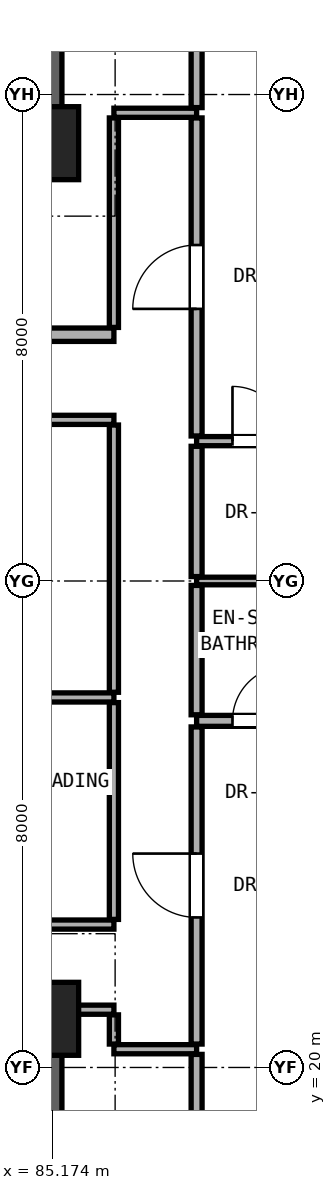
"""IFC4 building model, lengths in metres.
Left out: names, types, materials, properties, quantities, classifications, styles, units other than length and angle.
Written with IfcOpenShell. Run it as: python <this file> out.ifc"""

import sys

from ifc_helpers import new_model, si_unit, direction, frame, frame_2d, origin, origin_2d, place, context, subcontext, project, spatial, rectangle, extrude, element, fill, save


model = new_model("IFC4")
c1 = context("Model", 3, precision=1e-05, world=origin(), true_north=direction((0.0, 1.0)))
c2 = subcontext(c1, "Body", "Model", "MODEL_VIEW")
j1 = project(units=[si_unit("LENGTHUNIT", "METRE"), si_unit("PLANEANGLEUNIT", "RADIAN")], contexts=[c1])
p1 = place(None, origin())
s1 = spatial("IfcSite", under=j1, at=p1, CompositionType="ELEMENT")
p2 = place(p1, origin())
s2 = spatial("IfcBuilding", under=s1, at=p2, CompositionType="ELEMENT")
p3 = place(p2, frame((0.0, 0.0, 101.6)))
s3 = spatial("IfcBuildingStorey", under=s2, at=p3, CompositionType="ELEMENT", Elevation=101.6)
for number, where, z_axis, x_axis in (
    (1, (85.0, 20.8, 0.0), (0.0, 0.0, 1.0), (1.0, 0.0, 0.0)),
    (2, (85.0, 35.2, 0.0), (0.0, 0.0, 1.0), (1.0, 0.0, 0.0)),
):
    element("IfcColumn", number, at=place(p3, frame(where, z_axis=z_axis, x_axis=x_axis)), inside=s3, PredefinedType="COLUMN", context=c2, shape_type="SweptSolid", body=[
        extrude(rectangle(XDim=1.2, YDim=1.2, at=origin_2d()), origin(), (0.0, 0.0, 1.0), 3.3),
    ])
for number, where, z_axis, x_axis in (
    (3, (85.0, 35.2, 0.0), (0.0, 0.0, 1.0), (0.0, 1.0, 0.0)),
    (4, (85.0, 15.2, 0.0), (0.0, 0.0, 1.0), (0.0, 1.0, 0.0)),
):
    element("IfcWall", number, at=place(p3, frame(where, z_axis=z_axis, x_axis=x_axis)), inside=s3, PredefinedType="SHEAR", context=c2, shape_type="SweptSolid", body=[
        extrude(rectangle(XDim=5.6, YDim=0.65, at=frame_2d((2.8, 0.0))), origin(), (0.0, 0.0, 1.0), 3.08),
    ])
p4 = place(p3, frame((86.18, 20.3, 0.0), z_axis=(0.0, 0.0, 1.0), x_axis=(1.0, 0.0, 0.0)))
e5 = element("IfcWall", 5, at=p4, inside=s3, PredefinedType="PARTITIONING", context=c2, shape_type="SweptSolid", body=[
    extrude(rectangle(XDim=1.36, YDim=0.15, at=frame_2d((0.68, 0.0))), origin(), (0.0, 0.0, 1.0), 3.08),
])
p5 = place(p3, frame((85.32, 20.95, 0.0), z_axis=(0.0, 0.0, 1.0), x_axis=(1.0, 0.0, 0.0)))
e6 = element("IfcWall", 6, at=p5, inside=s3, PredefinedType="PARTITIONING", context=c2, shape_type="SweptSolid", body=[
    extrude(rectangle(XDim=0.86, YDim=0.15, at=frame_2d((0.43, 0.0))), origin(), (0.0, 0.0, 1.0), 2.472),
])
p6 = place(p3, frame((66.68, 22.35, 0.0), z_axis=(0.0, 0.0, 1.0), x_axis=(1.0, 0.0, 0.0)))
e7 = element("IfcWall", 7, at=p6, inside=s3, PredefinedType="PARTITIONING", context=c2, shape_type="SweptSolid", body=[
    extrude(rectangle(XDim=19.5, YDim=0.15, at=frame_2d((9.75, 0.0))), origin(), (0.0, 0.0, 1.0), 2.145),
])
p7 = place(p6, frame((8.902, 0.0, 0.0)))
e8 = element("IfcOpeningElement", 8, at=p7, cuts=e7, PredefinedType="OPENING", context=c2, shape_type="SweptSolid", body=[
    extrude(rectangle(XDim=0.85, YDim=2.01, at=frame_2d((0.425, 1.005))), frame((0.0, 0.085, 0.0), z_axis=(0.0, -1.0, 0.0), x_axis=(1.0, 0.0, 0.0)), (0.0, 0.0, 1.0), 0.17),
])
p8 = place(p6, frame((15.947, 0.0, 0.0)))
e9 = element("IfcOpeningElement", 9, at=p8, cuts=e7, PredefinedType="OPENING", context=c2, shape_type="SweptSolid", body=[
    extrude(rectangle(XDim=0.85, YDim=2.01, at=frame_2d((0.425, 1.005))), frame((0.0, 0.085, 0.0), z_axis=(0.0, -1.0, 0.0), x_axis=(1.0, 0.0, 0.0)), (0.0, 0.0, 1.0), 0.17),
])
p9 = place(p3, frame((87.54, 25.7, 0.0), z_axis=(0.0, 0.0, 1.0), x_axis=(1.0, 0.0, 0.0)))
e10 = element("IfcWall", 10, at=p9, inside=s3, PredefinedType="PARTITIONING", context=c2, shape_type="SweptSolid", body=[
    extrude(rectangle(XDim=7.054, YDim=0.18, at=frame_2d((3.527, 0.0))), origin(), (0.0, 0.0, 1.0), 2.216),
])
p10 = place(p9, frame((4.052, 0.0, 0.0)))
e11 = element("IfcOpeningElement", 11, at=p10, cuts=e10, PredefinedType="OPENING", context=c2, shape_type="SweptSolid", body=[
    extrude(rectangle(XDim=0.95, YDim=2.15, at=frame_2d((0.475, 1.075))), frame((0.0, 0.1, 0.0), z_axis=(0.0, -1.0, 0.0), x_axis=(1.0, 0.0, 0.0)), (0.0, 0.0, 1.0), 0.2),
])
p11 = place(p9, frame((0.59, 0.0, 0.0)))
e12 = element("IfcOpeningElement", 12, at=p11, cuts=e10, PredefinedType="OPENING", context=c2, shape_type="SweptSolid", body=[
    extrude(rectangle(XDim=0.9, YDim=2.1, at=frame_2d((0.45, 1.05))), frame((0.0, 0.1, 0.0), z_axis=(0.0, -1.0, 0.0), x_axis=(1.0, 0.0, 0.0)), (0.0, 0.0, 1.0), 0.2),
])
p12 = place(p3, frame((72.05, 26.085, 0.0), z_axis=(0.0, 0.0, 1.0), x_axis=(1.0, 0.0, 0.0)))
e13 = element("IfcWall", 13, at=p12, inside=s3, PredefinedType="PARTITIONING", context=c2, shape_type="SweptSolid", body=[
    extrude(rectangle(XDim=14.13, YDim=0.15, at=frame_2d((7.065, 0.0))), origin(), (0.0, 0.0, 1.0), 2.145),
])
p13 = place(p3, frame((87.54, 28.0, 0.0), z_axis=(0.0, 0.0, 1.0), x_axis=(1.0, 0.0, 0.0)))
e14 = element("IfcWall", 14, at=p13, inside=s3, PredefinedType="PARTITIONING", context=c2, shape_type="SweptSolid", body=[
    extrude(rectangle(XDim=7.054, YDim=0.125, at=frame_2d((3.527, 0.0))), origin(), (0.0, 0.0, 1.0), 2.216),
])
p14 = place(p3, frame((87.54, 30.3, 0.0), z_axis=(0.0, 0.0, 1.0), x_axis=(1.0, 0.0, 0.0)))
e15 = element("IfcWall", 15, at=p14, inside=s3, PredefinedType="PARTITIONING", context=c2, shape_type="SweptSolid", body=[
    extrude(rectangle(XDim=7.054, YDim=0.15, at=frame_2d((3.527, 0.0))), origin(), (0.0, 0.0, 1.0), 2.216),
])
p15 = place(p14, frame((4.052, 0.0, 0.0)))
e16 = element("IfcOpeningElement", 16, at=p15, cuts=e15, PredefinedType="OPENING", context=c2, shape_type="SweptSolid", body=[
    extrude(rectangle(XDim=0.95, YDim=2.15, at=frame_2d((0.475, 1.075))), frame((0.0, 0.085, 0.0), z_axis=(0.0, -1.0, 0.0), x_axis=(1.0, 0.0, 0.0)), (0.0, 0.0, 1.0), 0.17),
])
p16 = place(p14, frame((0.59, 0.0, 0.0)))
e17 = element("IfcOpeningElement", 17, at=p16, cuts=e15, PredefinedType="OPENING", context=c2, shape_type="SweptSolid", body=[
    extrude(rectangle(XDim=0.9, YDim=2.1, at=frame_2d((0.45, 1.05))), frame((0.0, 0.085, 0.0), z_axis=(0.0, -1.0, 0.0), x_axis=(1.0, 0.0, 0.0)), (0.0, 0.0, 1.0), 0.17),
])
p17 = place(p3, frame((66.68, 30.65, 0.0), z_axis=(0.0, 0.0, 1.0), x_axis=(1.0, 0.0, 0.0)))
e18 = element("IfcWall", 18, at=p17, inside=s3, PredefinedType="PARTITIONING", context=c2, shape_type="SweptSolid", body=[
    extrude(rectangle(XDim=19.5, YDim=0.15, at=frame_2d((9.75, 0.0))), origin(), (0.0, 0.0, 1.0), 2.145),
])
p18 = place(p17, frame((3.795, 0.0, 0.0)))
e19 = element("IfcOpeningElement", 19, at=p18, cuts=e18, PredefinedType="OPENING", context=c2, shape_type="SweptSolid", body=[
    extrude(rectangle(XDim=0.85, YDim=2.01, at=frame_2d((0.425, 1.005))), frame((0.0, 0.085, 0.0), z_axis=(0.0, -1.0, 0.0), x_axis=(1.0, 0.0, 0.0)), (0.0, 0.0, 1.0), 0.17),
])
p19 = place(p17, frame((8.902, 0.0, 0.0)))
e20 = element("IfcOpeningElement", 20, at=p19, cuts=e18, PredefinedType="OPENING", context=c2, shape_type="SweptSolid", body=[
    extrude(rectangle(XDim=0.85, YDim=2.01, at=frame_2d((0.425, 1.005))), frame((0.0, 0.085, 0.0), z_axis=(0.0, -1.0, 0.0), x_axis=(1.0, 0.0, 0.0)), (0.0, 0.0, 1.0), 0.17),
])
p20 = place(p17, frame((15.947, 0.0, 0.0)))
e21 = element("IfcOpeningElement", 21, at=p20, cuts=e18, PredefinedType="OPENING", context=c2, shape_type="SweptSolid", body=[
    extrude(rectangle(XDim=0.85, YDim=2.01, at=frame_2d((0.425, 1.005))), frame((0.0, 0.085, 0.0), z_axis=(0.0, -1.0, 0.0), x_axis=(1.0, 0.0, 0.0)), (0.0, 0.0, 1.0), 0.17),
])
p21 = place(p3, frame((71.55, 32.05, 0.0), z_axis=(0.0, 0.0, 1.0), x_axis=(1.0, 0.0, 0.0)))
e22 = element("IfcWall", 22, at=p21, inside=s3, PredefinedType="SOLIDWALL", context=c2, shape_type="SweptSolid", body=[
    extrude(rectangle(XDim=14.63, YDim=0.22, at=frame_2d((7.315, 0.0))), origin(), (0.0, 0.0, 1.0), 2.145),
])
p22 = place(p21, frame((6.065, 0.0, 0.0)))
e23 = element("IfcOpeningElement", 23, at=p22, cuts=e22, PredefinedType="OPENING", context=c2, shape_type="SweptSolid", body=[
    extrude(rectangle(XDim=0.85, YDim=2.01, at=frame_2d((0.425, 1.005))), frame((0.0, 0.12, 0.0), z_axis=(0.0, -1.0, 0.0), x_axis=(1.0, 0.0, 0.0)), (0.0, 0.0, 1.0), 0.24),
])
p23 = place(p21, frame((10.585, 0.0, 0.0)))
e24 = element("IfcOpeningElement", 24, at=p23, cuts=e22, PredefinedType="OPENING", context=c2, shape_type="SweptSolid", body=[
    extrude(rectangle(XDim=0.85, YDim=2.01, at=frame_2d((0.425, 1.005))), frame((0.0, 0.12, 0.0), z_axis=(0.0, -1.0, 0.0), x_axis=(1.0, 0.0, 0.0)), (0.0, 0.0, 1.0), 0.24),
])
p24 = place(p21, frame((1.65, 0.0, 0.0)))
e25 = element("IfcOpeningElement", 25, at=p24, cuts=e22, PredefinedType="OPENING", context=c2, shape_type="SweptSolid", body=[
    extrude(rectangle(XDim=0.85, YDim=2.01, at=frame_2d((0.425, 1.005))), frame((0.0, 0.12, 0.0), z_axis=(0.0, -1.0, 0.0), x_axis=(1.0, 0.0, 0.0)), (0.0, 0.0, 1.0), 0.24),
])
p25 = place(p3, frame((86.18, 35.7, 0.0), z_axis=(0.0, 0.0, 1.0), x_axis=(1.0, 0.0, 0.0)))
e26 = element("IfcWall", 26, at=p25, inside=s3, PredefinedType="PARTITIONING", context=c2, shape_type="SweptSolid", body=[
    extrude(rectangle(XDim=1.36, YDim=0.15, at=frame_2d((0.68, 0.0))), origin(), (0.0, 0.0, 1.0), 3.08),
])
p26 = place(p3, frame((86.18, 20.385, 0.0), z_axis=(0.0, 0.0, 1.0), x_axis=(0.0, 1.0, 0.0)))
e27 = element("IfcWall", 27, at=p26, inside=s3, PredefinedType="PARTITIONING", context=c2, shape_type="SweptSolid", body=[
    extrude(rectangle(XDim=0.48, YDim=0.15, at=frame_2d((0.24, 0.0))), origin(), (0.0, 0.0, 1.0), 2.472),
])
p27 = place(p3, frame((86.18, 22.435, 0.0), z_axis=(0.0, 0.0, 1.0), x_axis=(0.0, 1.0, 0.0)))
e28 = element("IfcWall", 28, at=p27, inside=s3, PredefinedType="PARTITIONING", context=c2, shape_type="SweptSolid", body=[
    extrude(rectangle(XDim=3.565, YDim=0.15, at=frame_2d((1.782, 0.0))), origin(), (0.0, 0.0, 1.0), 3.08),
])
p28 = place(p3, frame((86.18, 26.17, 0.0), z_axis=(0.0, 0.0, 1.0), x_axis=(0.0, 1.0, 0.0)))
e29 = element("IfcWall", 29, at=p28, inside=s3, PredefinedType="PARTITIONING", context=c2, shape_type="SweptSolid", body=[
    extrude(rectangle(XDim=4.395, YDim=0.15, at=frame_2d((2.198, 0.0))), origin(), (0.0, 0.0, 1.0), 2.299),
])
p29 = place(p3, frame((86.18, 32.17, 0.0), z_axis=(0.0, 0.0, 1.0), x_axis=(0.0, 1.0, 0.0)))
e30 = element("IfcWall", 30, at=p29, inside=s3, PredefinedType="PARTITIONING", context=c2, shape_type="SweptSolid", body=[
    extrude(rectangle(XDim=3.445, YDim=0.15, at=frame_2d((1.723, 0.0))), origin(), (0.0, 0.0, 1.0), 2.472),
])
p30 = place(p3, frame((87.54, 16.686, 0.0), z_axis=(0.0, 0.0, 1.0), x_axis=(0.0, 1.0, 0.0)))
e31 = element("IfcWall", 31, at=p30, inside=s3, PredefinedType="PARTITIONING", context=c2, shape_type="SweptSolid", body=[
    extrude(rectangle(XDim=3.529, YDim=0.18, at=frame_2d((1.765, 0.0))), origin(), (0.0, 0.0, 1.0), 2.456),
])
p31 = place(p3, frame((87.54, 20.385, 0.0), z_axis=(0.0, 0.0, 1.0), x_axis=(0.0, 1.0, 0.0)))
e32 = element("IfcWall", 32, at=p31, inside=s3, PredefinedType="PARTITIONING", context=c2, shape_type="SweptSolid", body=[
    extrude(rectangle(XDim=5.215, YDim=0.18, at=frame_2d((2.607, 0.0))), origin(), (0.0, 0.0, 1.0), 2.472),
])
p32 = place(p31, frame((2.083, 0.0, 0.0)))
e33 = element("IfcOpeningElement", 33, at=p32, cuts=e32, PredefinedType="OPENING", context=c2, shape_type="SweptSolid", body=[
    extrude(rectangle(XDim=1.05, YDim=2.2, at=frame_2d((0.525, 1.1))), frame((0.0, 0.1, 0.0), z_axis=(0.0, -1.0, 0.0), x_axis=(1.0, 0.0, 0.0)), (0.0, 0.0, 1.0), 0.2),
])
p33 = place(p3, frame((87.54, 25.8, 0.0), z_axis=(0.0, 0.0, 1.0), x_axis=(0.0, 1.0, 0.0)))
e34 = element("IfcWall", 34, at=p33, inside=s3, PredefinedType="PARTITIONING", context=c2, shape_type="SweptSolid", body=[
    extrude(rectangle(XDim=2.127, YDim=0.18, at=frame_2d((1.064, 0.0))), origin(), (0.0, 0.0, 1.0), 2.299),
])
p34 = place(p3, frame((87.54, 28.073, 0.0), z_axis=(0.0, 0.0, 1.0), x_axis=(0.0, 1.0, 0.0)))
e35 = element("IfcWall", 35, at=p34, inside=s3, PredefinedType="PARTITIONING", context=c2, shape_type="SweptSolid", body=[
    extrude(rectangle(XDim=2.143, YDim=0.18, at=frame_2d((1.071, 0.0))), origin(), (0.0, 0.0, 1.0), 2.299),
])
p35 = place(p3, frame((87.54, 30.385, 0.0), z_axis=(0.0, 0.0, 1.0), x_axis=(0.0, 1.0, 0.0)))
e36 = element("IfcWall", 36, at=p35, inside=s3, PredefinedType="PARTITIONING", context=c2, shape_type="SweptSolid", body=[
    extrude(rectangle(XDim=5.23, YDim=0.18, at=frame_2d((2.615, 0.0))), origin(), (0.0, 0.0, 1.0), 2.472),
])
p36 = place(p35, frame((2.09, 0.0, 0.0)))
e37 = element("IfcOpeningElement", 37, at=p36, cuts=e36, PredefinedType="OPENING", context=c2, shape_type="SweptSolid", body=[
    extrude(rectangle(XDim=1.05, YDim=2.2, at=frame_2d((0.525, 1.1))), frame((0.0, 0.1, 0.0), z_axis=(0.0, -1.0, 0.0), x_axis=(1.0, 0.0, 0.0)), (0.0, 0.0, 1.0), 0.2),
])
p37 = place(p3, frame((87.54, 35.785, 0.0), z_axis=(0.0, 0.0, 1.0), x_axis=(0.0, 1.0, 0.0)))
e38 = element("IfcWall", 38, at=p37, inside=s3, PredefinedType="PARTITIONING", context=c2, shape_type="SweptSolid", body=[
    extrude(rectangle(XDim=3.544, YDim=0.18, at=frame_2d((1.772, 0.0))), origin(), (0.0, 0.0, 1.0), 2.456),
])
p38 = place(p32, origin())
e39 = element("IfcDoor", 39, at=p38, inside=s3, OperationType="SINGLE_SWING_RIGHT", PredefinedType="DOOR", context=c2, shape_type="SweptSolid", body=[
    extrude(rectangle(XDim=1.05, YDim=2.2, at=frame_2d((0.525, 1.1))), frame((0.0, 0.025, 0.0), z_axis=(0.0, -1.0, 0.0), x_axis=(1.0, 0.0, 0.0)), (0.0, 0.0, 1.0), 0.05),
])
fill(e33, e39)
p39 = place(p11, origin())
e40 = element("IfcDoor", 40, at=p39, inside=s3, OperationType="SINGLE_SWING_RIGHT", PredefinedType="DOOR", context=c2, shape_type="SweptSolid", body=[
    extrude(rectangle(XDim=0.9, YDim=2.1, at=frame_2d((0.45, 1.05))), frame((0.0, 0.025, 0.0), z_axis=(0.0, -1.0, 0.0), x_axis=(1.0, 0.0, 0.0)), (0.0, 0.0, 1.0), 0.05),
])
fill(e12, e40)
p40 = place(p36, origin())
e41 = element("IfcDoor", 41, at=p40, inside=s3, OperationType="SINGLE_SWING_LEFT", PredefinedType="DOOR", context=c2, shape_type="SweptSolid", body=[
    extrude(rectangle(XDim=1.05, YDim=2.2, at=frame_2d((0.525, 1.1))), frame((0.0, 0.025, 0.0), z_axis=(0.0, -1.0, 0.0), x_axis=(1.0, 0.0, 0.0)), (0.0, 0.0, 1.0), 0.05),
])
fill(e37, e41)
p41 = place(p16, origin())
e42 = element("IfcDoor", 42, at=p41, inside=s3, OperationType="SINGLE_SWING_LEFT", PredefinedType="DOOR", context=c2, shape_type="SweptSolid", body=[
    extrude(rectangle(XDim=0.9, YDim=2.1, at=frame_2d((0.45, 1.05))), frame((0.0, 0.025, 0.0), z_axis=(0.0, -1.0, 0.0), x_axis=(1.0, 0.0, 0.0)), (0.0, 0.0, 1.0), 0.05),
])
fill(e17, e42)
save(model, sys.argv[1])
